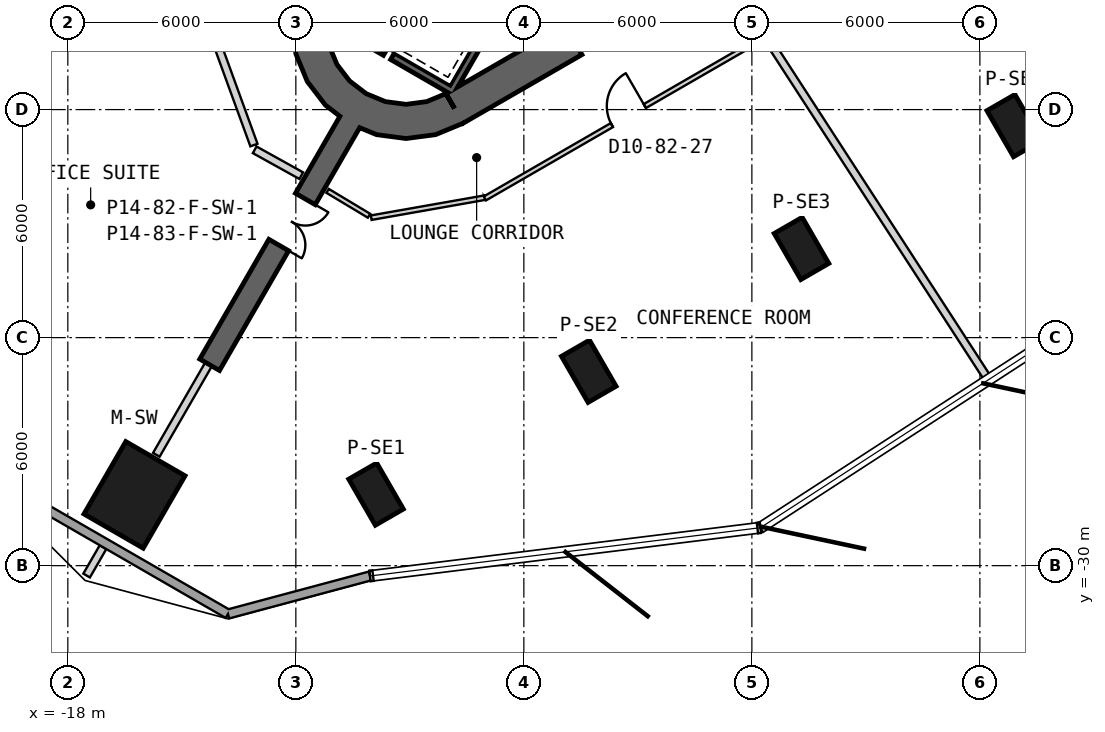
"""IFC4 building model, lengths in metres.
Left out: names, types, materials, properties, quantities, classifications, styles, units other than length and angle.
Written with IfcOpenShell. Run it as: python <this file> out.ifc"""

import sys

from ifc_helpers import new_model, si_unit, direction, frame, frame_2d, origin, origin_2d, place, context, subcontext, project, spatial, polyline, rectangle, outline, extrude, element, fill, save


model = new_model("IFC4")
c1 = context("Model", 3, precision=1e-05, world=origin(), true_north=direction((0.0, 1.0)))
c2 = subcontext(c1, "Body", "Model", "MODEL_VIEW")
j1 = project(units=[si_unit("LENGTHUNIT", "METRE"), si_unit("PLANEANGLEUNIT", "RADIAN")], contexts=[c1])
p1 = place(None, origin())
s1 = spatial("IfcSite", under=j1, at=p1, CompositionType="ELEMENT")
p2 = place(p1, origin())
s2 = spatial("IfcBuilding", under=s1, at=p2, CompositionType="ELEMENT")
p3 = place(p2, frame((0.0, 0.0, 357.2)))
s3 = spatial("IfcBuildingStorey", under=s2, at=p3, CompositionType="ELEMENT", Elevation=357.2)
p4 = place(p3, frame((-16.246, -28.138, 0.0), z_axis=(0.0, 0.0, 1.0), x_axis=(-0.5, -0.866025403784, 0.0)))
e1 = element("IfcColumn", 1, at=p4, inside=s3, PredefinedType="COLUMN", context=c2, shape_type="SweptSolid", body=[
    extrude(rectangle(XDim=2.2, YDim=1.8, at=origin_2d()), origin(), (0.0, 0.0, 1.0), 3.9),
])
for number, where, z_axis, x_axis in (
    (2, (-9.89, -28.118, 0.0), (0.0, 0.0, 1.0), (0.5, -0.866, 0.0)),
    (3, (-4.292, -24.886, 0.0), (0.0, 0.0, 1.0), (0.5, -0.866, 0.0)),
    (4, (1.306, -21.654, 0.0), (0.0, 0.0, 1.0), (0.5, -0.866, 0.0)),
    (5, (6.904, -18.422, 0.0), (0.0, 0.0, 1.0), (0.5, -0.866, 0.0)),
):
    element("IfcColumn", number, at=place(p3, frame(where, z_axis=z_axis, x_axis=x_axis)), inside=s3, PredefinedType="COLUMN", context=c2, shape_type="SweptSolid", body=[
        extrude(rectangle(XDim=1.4, YDim=0.85, at=origin_2d()), origin(), (0.0, 0.0, 1.0), 3.9),
    ])
p5 = place(p3, frame((-7.825, -17.97, 0.0), z_axis=(0.0, 0.0, 1.0), x_axis=(0.866028369851, 0.499994862586, 0.0)))
e6 = element("IfcWall", 6, at=p5, inside=s3, PredefinedType="SHEAR", context=c2, shape_type="SweptSolid", body=[
    extrude(rectangle(XDim=31.523, YDim=0.9, at=frame_2d((15.762, 0.0))), origin(), (0.0, 0.0, 1.0), 3.9),
])
p6 = place(p5, frame((17.862, 0.0, 0.0)))
e7 = element("IfcOpeningElement", 7, at=p6, cuts=e6, PredefinedType="OPENING", context=c2, shape_type="SweptSolid", body=[
    extrude(rectangle(XDim=1.2, YDim=2.4, at=frame_2d((0.6, 1.2))), frame((0.0, 0.46, 0.0), z_axis=(0.0, -1.0, 0.0), x_axis=(1.0, 0.0, 0.0)), (0.0, 0.0, 1.0), 0.92),
])
p7 = place(p5, frame((20.562, 0.0, 0.0)))
e8 = element("IfcOpeningElement", 8, at=p7, cuts=e6, PredefinedType="OPENING", context=c2, shape_type="SweptSolid", body=[
    extrude(rectangle(XDim=1.2, YDim=2.4, at=frame_2d((0.6, 1.2))), frame((0.0, 0.46, 0.0), z_axis=(0.0, -1.0, 0.0), x_axis=(1.0, 0.0, 0.0)), (0.0, 0.0, 1.0), 0.92),
])
p8 = place(p5, frame((26.712, 0.0, 0.0)))
e9 = element("IfcOpeningElement", 9, at=p8, cuts=e6, PredefinedType="OPENING", context=c2, shape_type="SweptSolid", body=[
    extrude(rectangle(XDim=1.2, YDim=2.4, at=frame_2d((0.6, 1.2))), frame((0.0, 0.46, 0.0), z_axis=(0.0, -1.0, 0.0), x_axis=(1.0, 0.0, 0.0)), (0.0, 0.0, 1.0), 0.92),
])
p9 = place(p5, frame((3.612, 0.0, 0.0)))
e10 = element("IfcOpeningElement", 10, at=p9, cuts=e6, PredefinedType="OPENING", context=c2, shape_type="SweptSolid", body=[
    extrude(rectangle(XDim=1.2, YDim=2.4, at=frame_2d((0.6, 1.2))), frame((0.0, 0.46, 0.0), z_axis=(0.0, -1.0, 0.0), x_axis=(1.0, 0.0, 0.0)), (0.0, 0.0, 1.0), 0.92),
])
p10 = place(p3, origin())
e11 = element("IfcWall", 11, at=p10, inside=s3, PredefinedType="SHEAR", context=c2, shape_type="SweptSolid", body=[
    extrude(outline(polyline([(-12.1, -15.762), (-11.998, -16.538), (-11.698, -17.262), (-11.221, -17.883), (-10.6, -18.36), (-9.876, -18.659), (-9.1, -18.762), (-8.323, -18.659), (-7.6, -18.36), (-8.05, -17.58), (-8.556, -17.79), (-9.1, -17.862), (-9.644, -17.79), (-10.15, -17.58), (-10.585, -17.247), (-10.919, -16.812), (-11.128, -16.305), (-11.2, -15.762), (-12.1, -15.762)])), origin(), (0.0, 0.0, 1.0), 3.9),
])
p11 = place(p3, frame((-10.575, -18.316, 0.0), z_axis=(0.0, 0.0, 1.0), x_axis=(-0.500009454961, -0.866019944892, 0.0)))
e12 = element("IfcWall", 12, at=p11, inside=s3, PredefinedType="SHEAR", context=c2, shape_type="SweptSolid", body=[
    extrude(rectangle(XDim=7.388, YDim=0.6, at=frame_2d((3.694, 0.0))), origin(), (0.0, 0.0, 1.0), 3.9),
])
p12 = place(p11, frame((1.4, 0.0, 0.0)))
e13 = element("IfcOpeningElement", 13, at=p12, cuts=e12, PredefinedType="OPENING", context=c2, shape_type="SweptSolid", body=[
    extrude(rectangle(XDim=1.4, YDim=2.4, at=frame_2d((0.7, 1.2))), frame((0.0, 0.31, 0.0), z_axis=(0.0, -1.0, 0.0), x_axis=(1.0, 0.0, 0.0)), (0.0, 0.0, 1.0), 0.62),
])
p13 = place(p3, frame((-20.191, -27.575, 0.0), z_axis=(0.0, 0.0, 1.0), x_axis=(0.866022320763, -0.500005339912, 0.0)))
e14 = element("IfcWall", 14, at=p13, inside=s3, PredefinedType="SOLIDWALL", context=c2, shape_type="SweptSolid", body=[
    extrude(rectangle(XDim=7.396, YDim=0.24, at=frame_2d((3.698, 0.0))), origin(), (0.0, 0.0, 1.0), 3.6),
])
p14 = place(p3, frame((-13.786, -31.273, 0.0), z_axis=(0.0, 0.0, 1.0), x_axis=(0.965917910961, 0.258848583704, 0.0)))
e15 = element("IfcWall", 15, at=p14, inside=s3, PredefinedType="SOLIDWALL", context=c2, shape_type="SweptSolid", body=[
    extrude(rectangle(XDim=3.869, YDim=0.24, at=frame_2d((1.935, 0.0))), origin(), (0.0, 0.0, 1.0), 3.6),
])
p15 = place(p3, frame((-3.905, -10.563, -0.3), z_axis=(0.0, 0.0, 1.0), x_axis=(-0.500012932018, -0.866017937352, 0.0)))
e16 = element("IfcWall", 16, at=p15, inside=s3, PredefinedType="SHEAR", context=c2, shape_type="SweptSolid", body=[
    extrude(rectangle(XDim=8.1, YDim=0.2, at=frame_2d((4.05, 0.0))), origin(), (0.0, 0.0, 1.0), 3.9),
])
p16 = place(p3, frame((-11.282, -15.541, -0.3), z_axis=(0.0, 0.0, 1.0), x_axis=(0.866000483506, -0.500043160704, 0.0)))
e17 = element("IfcWall", 17, at=p16, inside=s3, PredefinedType="SHEAR", context=c2, shape_type="SweptSolid", body=[
    extrude(rectangle(XDim=3.8, YDim=0.2, at=frame_2d((1.9, 0.0))), origin(), (0.0, 0.0, 1.0), 3.9),
])
p17 = place(p3, frame((-14.293, -19.978, 0.0), z_axis=(0.0, 0.0, 1.0), x_axis=(0.872510000486, -0.48859625362, 0.0)))
e18 = element("IfcWall", 18, at=p17, inside=s3, PredefinedType="PARTITIONING", context=c2, shape_type="SweptSolid", body=[
    extrude(rectangle(XDim=2.09, YDim=0.2, at=frame_2d((1.045, 0.0))), origin(), (0.0, 0.0, 1.0), 3.6),
])
p18 = place(p3, frame((-15.534, -16.346, 0.0), z_axis=(0.0, 0.0, 1.0), x_axis=(0.342001008711, -0.939699584996, 0.0)))
e19 = element("IfcWall", 19, at=p18, inside=s3, PredefinedType="PARTITIONING", context=c2, shape_type="SweptSolid", body=[
    extrude(rectangle(XDim=3.875, YDim=0.2, at=frame_2d((1.938, 0.0))), origin(), (0.0, 0.0, 1.0), 2.88),
])
p19 = place(p3, frame((-6.505, -21.885, 0.0), z_axis=(0.0, 0.0, 1.0), x_axis=(0.866023249944, 0.500003730543, 0.0)))
e20 = element("IfcWall", 20, at=p19, inside=s3, PredefinedType="PARTITIONING", context=c2, shape_type="SweptSolid", body=[
    extrude(rectangle(XDim=9.016, YDim=0.2, at=frame_2d((4.508, 0.0))), origin(), (0.0, 0.0, 1.0), 2.97),
])
p20 = place(p19, frame((4.049, 0.0, 0.0)))
e21 = element("IfcOpeningElement", 21, at=p20, cuts=e20, PredefinedType="OPENING", context=c2, shape_type="SweptSolid", body=[
    extrude(rectangle(XDim=1.0, YDim=2.1, at=frame_2d((0.5, 1.05))), frame((0.0, 0.11, 0.0), z_axis=(0.0, -1.0, 0.0), x_axis=(1.0, 0.0, 0.0)), (0.0, 0.0, 1.0), 0.22),
])
p21 = place(p3, frame((1.303, -17.376, 0.0), z_axis=(0.0, 0.0, 1.0), x_axis=(0.866024719138, 0.50000118584, 0.0)))
e22 = element("IfcWall", 22, at=p21, inside=s3, PredefinedType="PARTITIONING", context=c2, shape_type="SweptSolid", body=[
    extrude(rectangle(XDim=14.305, YDim=0.2, at=frame_2d((7.152, 0.0))), origin(), (0.0, 0.0, 1.0), 3.07),
])
p22 = place(p21, frame((6.644, 0.0, 0.0)))
e23 = element("IfcOpeningElement", 23, at=p22, cuts=e22, PredefinedType="OPENING", context=c2, shape_type="SweptSolid", body=[
    extrude(rectangle(XDim=1.0, YDim=2.1, at=frame_2d((0.5, 1.05))), frame((0.0, 0.11, 0.0), z_axis=(0.0, -1.0, 0.0), x_axis=(1.0, 0.0, 0.0)), (0.0, 0.0, 1.0), 0.22),
])
p23 = place(p3, frame((-10.406, -22.538, 0.0), z_axis=(0.0, 0.0, 1.0), x_axis=(0.98480284819, 0.173675991999, 0.0)))
e24 = element("IfcWall", 24, at=p23, inside=s3, PredefinedType="PARTITIONING", context=c2, shape_type="SweptSolid", body=[
    extrude(rectangle(XDim=3.949, YDim=0.2, at=frame_2d((1.974, 0.0))), origin(), (0.0, 0.0, 1.0), 2.88),
])
p24 = place(p3, frame((-12.05, -21.472, 0.0), z_axis=(0.0, 0.0, 1.0), x_axis=(0.859577966481, -0.511004617924, 0.0)))
e25 = element("IfcWall", 25, at=p24, inside=s3, PredefinedType="PARTITIONING", context=c2, shape_type="SweptSolid", body=[
    extrude(rectangle(XDim=1.998, YDim=0.2, at=frame_2d((0.999, 0.0))), origin(), (0.0, 0.0, 1.0), 3.6),
])
p25 = place(p3, frame((-17.074, -29.513, 0.0), z_axis=(0.0, 0.0, 1.0), x_axis=(-0.500065409566, -0.86598763626, 0.0)))
e26 = element("IfcWall", 26, at=p25, inside=s3, PredefinedType="PARTITIONING", context=c2, shape_type="SweptSolid", body=[
    extrude(rectangle(XDim=0.863, YDim=0.2, at=frame_2d((0.431, 0.0))), origin(), (0.0, 0.0, 1.0), 3.6),
])
p26 = place(p3, frame((-14.284, -24.706, 0.0), z_axis=(0.0, 0.0, 1.0), x_axis=(-0.503849746753, -0.863791313164, 0.0)))
e27 = element("IfcWall", 27, at=p26, inside=s3, PredefinedType="PARTITIONING", context=c2, shape_type="SweptSolid", body=[
    extrude(rectangle(XDim=2.854, YDim=0.2, at=frame_2d((1.427, 0.0))), origin(), (0.0, 0.0, 1.0), 3.17),
])
p27 = place(p3, frame((6.277, -25.076, 0.0), z_axis=(0.0, 0.0, 1.0), x_axis=(-0.5442423271, 0.838928059724, 0.0)))
e28 = element("IfcWall", 28, at=p27, inside=s3, PredefinedType="PARTITIONING", context=c2, shape_type="SweptSolid", body=[
    extrude(rectangle(XDim=9.067, YDim=0.2, at=frame_2d((4.533, 0.0))), origin(), (0.0, 0.0, 1.0), 3.6),
])
p28 = place(p20, origin())
e29 = element("IfcDoor", 29, at=p28, inside=s3, OperationType="SINGLE_SWING_RIGHT", PredefinedType="USERDEFINED", context=c2, shape_type="SweptSolid", body=[
    extrude(rectangle(XDim=1.0, YDim=2.1, at=frame_2d((0.5, 1.05))), frame((0.0, 0.025, 0.0), z_axis=(0.0, -1.0, 0.0), x_axis=(1.0, 0.0, 0.0)), (0.0, 0.0, 1.0), 0.05),
])
fill(e21, e29)
p29 = place(p12, origin())
e30 = element("IfcDoor", 30, at=p29, inside=s3, OperationType="DOUBLE_DOOR_SINGLE_SWING", PredefinedType="NOTDEFINED", context=c2, shape_type="SweptSolid", body=[
    extrude(rectangle(XDim=1.4, YDim=2.4, at=frame_2d((0.7, 1.2))), frame((0.0, 0.025, 0.0), z_axis=(0.0, -1.0, 0.0), x_axis=(1.0, 0.0, 0.0)), (0.0, 0.0, 1.0), 0.05),
])
fill(e13, e30)
save(model, sys.argv[1])
